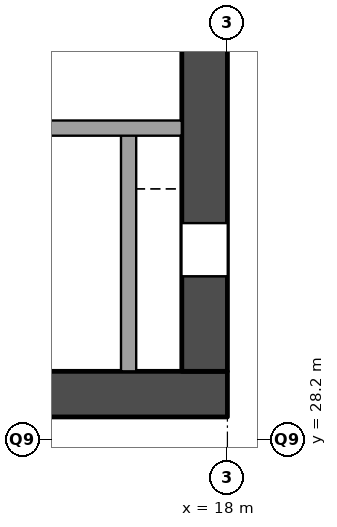
"""IFC4 building model, lengths in metres.
Left out: names, types, materials, properties, quantities, classifications, styles, units other than length and angle.
Written with IfcOpenShell. Run it as: python <this file> out.ifc"""

import sys

from ifc_helpers import new_model, si_unit, direction, frame, frame_2d, origin, place, context, subcontext, project, spatial, rectangle, extrude, element, fill, save


model = new_model("IFC4")
c1 = context("Model", 3, precision=1e-05, world=origin(), true_north=direction((0.0, 1.0)))
c2 = subcontext(c1, "Body", "Model", "MODEL_VIEW")
j1 = project(units=[si_unit("LENGTHUNIT", "METRE"), si_unit("PLANEANGLEUNIT", "RADIAN")], contexts=[c1])
p1 = place(None, origin())
s1 = spatial("IfcSite", under=j1, at=p1, CompositionType="ELEMENT")
p2 = place(p1, origin())
s2 = spatial("IfcBuilding", under=s1, at=p2, CompositionType="ELEMENT")
p3 = place(p2, frame((0.0, 0.0, 38.6)))
s3 = spatial("IfcBuildingStorey", under=s2, at=p3, CompositionType="ELEMENT", Elevation=38.6)
p4 = place(p3, frame((5.6, 28.8, 0.0), z_axis=(0.0, 0.0, 1.0), x_axis=(1.0, 0.0, 0.0)))
e1 = element("IfcWall", 1, at=p4, inside=s3, PredefinedType="SHEAR", context=c2, shape_type="SweptSolid", body=[
    extrude(rectangle(XDim=12.4, YDim=0.6, at=frame_2d((6.2, 0.0))), origin(), (0.0, 0.0, 1.0), 3.5),
])
p5 = place(p4, frame((1.05, 0.0, 0.0)))
e2 = element("IfcOpeningElement", 2, at=p5, cuts=e1, PredefinedType="OPENING", context=c2, shape_type="SweptSolid", body=[
    extrude(rectangle(XDim=1.2, YDim=2.1, at=frame_2d((0.6, 1.05))), frame((0.0, 0.31, 0.0), z_axis=(0.0, -1.0, 0.0), x_axis=(1.0, 0.0, 0.0)), (0.0, 0.0, 1.0), 0.62),
])
p6 = place(p4, frame((5.25, 0.0, 0.0)))
e3 = element("IfcOpeningElement", 3, at=p6, cuts=e1, PredefinedType="OPENING", context=c2, shape_type="SweptSolid", body=[
    extrude(rectangle(XDim=1.2, YDim=2.1, at=frame_2d((0.6, 1.05))), frame((0.0, 0.31, 0.0), z_axis=(0.0, -1.0, 0.0), x_axis=(1.0, 0.0, 0.0)), (0.0, 0.0, 1.0), 0.62),
])
p7 = place(p4, frame((7.35, 0.0, 0.0)))
e4 = element("IfcOpeningElement", 4, at=p7, cuts=e1, PredefinedType="OPENING", context=c2, shape_type="SweptSolid", body=[
    extrude(rectangle(XDim=1.2, YDim=2.1, at=frame_2d((0.6, 1.05))), frame((0.0, 0.31, 0.0), z_axis=(0.0, -1.0, 0.0), x_axis=(1.0, 0.0, 0.0)), (0.0, 0.0, 1.0), 0.62),
])
p8 = place(p3, frame((17.7, 29.1, 0.0), z_axis=(0.0, 0.0, 1.0), x_axis=(0.0, 1.0, 0.0)))
e5 = element("IfcWall", 5, at=p8, inside=s3, PredefinedType="SHEAR", context=c2, shape_type="SweptSolid", body=[
    extrude(rectangle(XDim=20.3, YDim=0.6, at=frame_2d((10.15, 0.0))), origin(), (0.0, 0.0, 1.0), 3.5),
])
p9 = place(p8, frame((1.25, 0.0, 0.0)))
e6 = element("IfcOpeningElement", 6, at=p9, cuts=e5, PredefinedType="OPENING", context=c2, shape_type="SweptSolid", body=[
    extrude(rectangle(XDim=0.7, YDim=2.1, at=frame_2d((0.35, 1.05))), frame((0.0, 0.31, 0.0), z_axis=(0.0, -1.0, 0.0), x_axis=(1.0, 0.0, 0.0)), (0.0, 0.0, 1.0), 0.62),
])
p10 = place(p8, frame((7.05, 0.0, 0.0)))
e7 = element("IfcOpeningElement", 7, at=p10, cuts=e5, PredefinedType="OPENING", context=c2, shape_type="SweptSolid", body=[
    extrude(rectangle(XDim=0.7, YDim=2.1, at=frame_2d((0.35, 1.05))), frame((0.0, 0.31, 0.0), z_axis=(0.0, -1.0, 0.0), x_axis=(1.0, 0.0, 0.0)), (0.0, 0.0, 1.0), 0.62),
])
p11 = place(p3, frame((16.7, 29.1, 0.0), z_axis=(0.0, 0.0, 1.0), x_axis=(0.0, 1.0, 0.0)))
e8 = element("IfcWall", 8, at=p11, inside=s3, PredefinedType="SOLIDWALL", context=c2, shape_type="SweptSolid", body=[
    extrude(rectangle(XDim=3.2, YDim=0.2, at=frame_2d((1.6, 0.0))), origin(), (0.0, 0.0, 1.0), 3.5),
])
p12 = place(p3, frame((6.2, 32.3, 0.0), z_axis=(0.0, 0.0, 1.0), x_axis=(1.0, 0.0, 0.0)))
e9 = element("IfcWall", 9, at=p12, inside=s3, PredefinedType="SOLIDWALL", context=c2, shape_type="SweptSolid", body=[
    extrude(rectangle(XDim=11.2, YDim=0.2, at=frame_2d((5.6, 0.0))), origin(), (0.0, 0.0, 1.0), 3.5),
])
p13 = place(p12, frame((2.55, 0.0, 0.0)))
e10 = element("IfcOpeningElement", 10, at=p13, cuts=e9, PredefinedType="OPENING", context=c2, shape_type="SweptSolid", body=[
    extrude(rectangle(XDim=1.2, YDim=2.1, at=frame_2d((0.6, 1.05))), frame((0.0, 0.11, 0.0), z_axis=(0.0, -1.0, 0.0), x_axis=(1.0, 0.0, 0.0)), (0.0, 0.0, 1.0), 0.22),
])
p14 = place(p9, origin())
e11 = element("IfcDoor", 11, at=p14, inside=s3, OperationType="SINGLE_SWING_LEFT", PredefinedType="DOOR", context=c2, shape_type="SweptSolid", body=[
    extrude(rectangle(XDim=0.7, YDim=2.1, at=frame_2d((0.35, 1.05))), frame((0.0, 0.025, 0.0), z_axis=(0.0, -1.0, 0.0), x_axis=(1.0, 0.0, 0.0)), (0.0, 0.0, 1.0), 0.05),
])
fill(e6, e11)
save(model, sys.argv[1])
